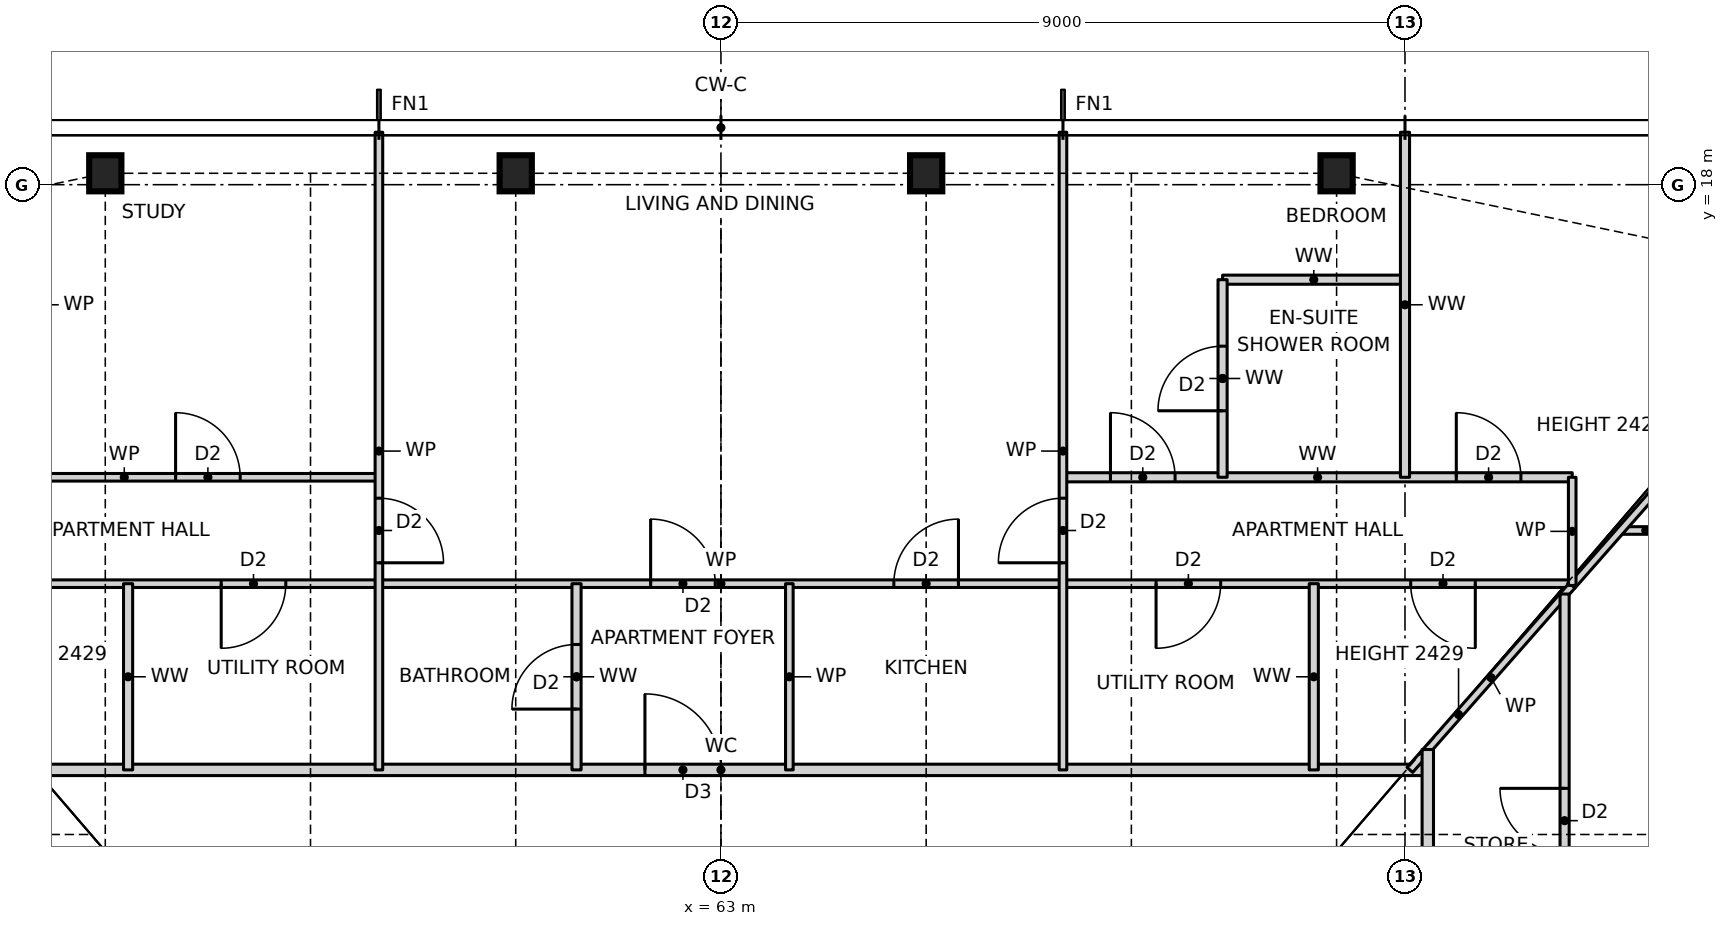
"""IFC4 building model, lengths in metres.
Left out: names, types, materials, properties, quantities, classifications, styles, units other than length and angle.
Written with IfcOpenShell. Run it as: python <this file> out.ifc"""

import sys

from ifc_helpers import new_model, si_unit, direction, frame, frame_2d, origin, origin_2d, place, context, subcontext, project, spatial, rectangle, i_section, extrude, element, fill, save


model = new_model("IFC4")
c1 = context("Model", 3, precision=1e-05, world=origin(), true_north=direction((0.0, 1.0)))
c2 = subcontext(c1, "Body", "Model", "MODEL_VIEW")
j1 = project(units=[si_unit("LENGTHUNIT", "METRE"), si_unit("PLANEANGLEUNIT", "RADIAN")], contexts=[c1])
p1 = place(None, origin())
s1 = spatial("IfcSite", under=j1, at=p1, CompositionType="ELEMENT")
p2 = place(p1, origin())
s2 = spatial("IfcBuilding", under=s1, at=p2, CompositionType="ELEMENT")
p3 = place(p2, frame((0.0, 0.0, 15.0)))
s3 = spatial("IfcBuildingStorey", under=s2, at=p3, CompositionType="ELEMENT", Elevation=15.0)
for number, where, z_axis, x_axis in (
    (1, (71.1, 18.15, 0.0), (0.0, 0.0, 1.0), (1.0, 0.0, 0.0)),
    (2, (65.7, 18.15, 0.0), (0.0, 0.0, 1.0), (1.0, 0.0, 0.0)),
    (3, (60.3, 18.15, 0.0), (0.0, 0.0, 1.0), (1.0, 0.0, 0.0)),
    (4, (54.9, 18.15, 0.0), (0.0, 0.0, 1.0), (1.0, 0.0, 0.0)),
):
    element("IfcColumn", number, at=place(p3, frame(where, z_axis=z_axis, x_axis=x_axis)), inside=s3, PredefinedType="COLUMN", context=c2, shape_type="SweptSolid", body=[
        extrude(i_section(OverallWidth=0.424, OverallDepth=0.475, WebThickness=0.048, FlangeThickness=0.077, at=origin_2d()), origin(), (0.0, 0.0, 1.0), 3.5),
    ])
p4 = place(p3, frame((53.7, 10.3, 0.0), z_axis=(0.0, 0.0, 1.0), x_axis=(1.0, 0.0, 0.0)))
e5 = element("IfcWall", 5, at=p4, inside=s3, PredefinedType="PARTITIONING", context=c2, shape_type="SweptSolid", body=[
    extrude(rectangle(XDim=18.6, YDim=0.15, at=frame_2d((9.3, 0.0))), origin(), (0.0, 0.0, 1.0), 3.27),
])
p5 = place(p4, frame((8.3, 0.0, 0.0)))
e6 = element("IfcOpeningElement", 6, at=p5, cuts=e5, PredefinedType="OPENING", context=c2, shape_type="SweptSolid", body=[
    extrude(rectangle(XDim=1.0, YDim=2.1, at=frame_2d((0.5, 1.05))), frame((0.0, 0.085, 0.0), z_axis=(0.0, -1.0, 0.0), x_axis=(1.0, 0.0, 0.0)), (0.0, 0.0, 1.0), 0.17),
])
p6 = place(p3, frame((51.8, 12.75, 0.0), z_axis=(0.0, 0.0, 1.0), x_axis=(1.0, 0.0, 0.0)))
e7 = element("IfcWall", 7, at=p6, inside=s3, PredefinedType="PARTITIONING", context=c2, shape_type="SweptSolid", body=[
    extrude(rectangle(XDim=22.4, YDim=0.1, at=frame_2d((11.2, 0.0))), origin(), (0.0, 0.0, 1.0), 3.27),
])
p7 = place(p6, frame((13.475, 0.0, 0.0)))
e8 = element("IfcOpeningElement", 8, at=p7, cuts=e7, PredefinedType="OPENING", context=c2, shape_type="SweptSolid", body=[
    extrude(rectangle(XDim=0.85, YDim=2.1, at=frame_2d((0.425, 1.05))), frame((0.0, 0.06, 0.0), z_axis=(0.0, -1.0, 0.0), x_axis=(1.0, 0.0, 0.0)), (0.0, 0.0, 1.0), 0.12),
])
p8 = place(p6, frame((10.275, 0.0, 0.0)))
e9 = element("IfcOpeningElement", 9, at=p8, cuts=e7, PredefinedType="OPENING", context=c2, shape_type="SweptSolid", body=[
    extrude(rectangle(XDim=0.85, YDim=2.1, at=frame_2d((0.425, 1.05))), frame((0.0, 0.06, 0.0), z_axis=(0.0, -1.0, 0.0), x_axis=(1.0, 0.0, 0.0)), (0.0, 0.0, 1.0), 0.12),
])
p9 = place(p6, frame((16.925, 0.0, 0.0)))
e10 = element("IfcOpeningElement", 10, at=p9, cuts=e7, PredefinedType="OPENING", context=c2, shape_type="SweptSolid", body=[
    extrude(rectangle(XDim=0.85, YDim=2.1, at=frame_2d((0.425, 1.05))), frame((0.0, 0.06, 0.0), z_axis=(0.0, -1.0, 0.0), x_axis=(1.0, 0.0, 0.0)), (0.0, 0.0, 1.0), 0.12),
])
p10 = place(p6, frame((20.275, 0.0, 0.0)))
e11 = element("IfcOpeningElement", 11, at=p10, cuts=e7, PredefinedType="OPENING", context=c2, shape_type="SweptSolid", body=[
    extrude(rectangle(XDim=0.85, YDim=2.1, at=frame_2d((0.425, 1.05))), frame((0.0, 0.06, 0.0), z_axis=(0.0, -1.0, 0.0), x_axis=(1.0, 0.0, 0.0)), (0.0, 0.0, 1.0), 0.12),
])
p11 = place(p6, frame((4.625, 0.0, 0.0)))
e12 = element("IfcOpeningElement", 12, at=p11, cuts=e7, PredefinedType="OPENING", context=c2, shape_type="SweptSolid", body=[
    extrude(rectangle(XDim=0.85, YDim=2.1, at=frame_2d((0.425, 1.05))), frame((0.0, 0.06, 0.0), z_axis=(0.0, -1.0, 0.0), x_axis=(1.0, 0.0, 0.0)), (0.0, 0.0, 1.0), 0.12),
])
p12 = place(p6, frame((1.275, 0.0, 0.0)))
e13 = element("IfcOpeningElement", 13, at=p12, cuts=e7, PredefinedType="OPENING", context=c2, shape_type="SweptSolid", body=[
    extrude(rectangle(XDim=0.85, YDim=2.1, at=frame_2d((0.425, 1.05))), frame((0.0, 0.06, 0.0), z_axis=(0.0, -1.0, 0.0), x_axis=(1.0, 0.0, 0.0)), (0.0, 0.0, 1.0), 0.12),
])
p13 = place(p3, frame((74.836, 13.45, 0.0), z_axis=(0.0, 0.0, 1.0), x_axis=(1.0, 0.0, 0.0)))
e14 = element("IfcWall", 14, at=p13, inside=s3, PredefinedType="PARTITIONING", context=c2, shape_type="SweptSolid", body=[
    extrude(rectangle(XDim=0.664, YDim=0.1, at=frame_2d((0.332, 0.0))), origin(), (0.0, 0.0, 1.0), 3.27),
])
p14 = place(p3, frame((51.8, 14.15, 0.0), z_axis=(0.0, 0.0, 1.0), x_axis=(1.0, 0.0, 0.0)))
e15 = element("IfcWall", 15, at=p14, inside=s3, PredefinedType="PARTITIONING", context=c2, shape_type="SweptSolid", body=[
    extrude(rectangle(XDim=6.7, YDim=0.1, at=frame_2d((3.35, 0.0))), origin(), (0.0, 0.0, 1.0), 3.27),
])
p15 = place(p14, frame((4.025, 0.0, 0.0)))
e16 = element("IfcOpeningElement", 16, at=p15, cuts=e15, PredefinedType="OPENING", context=c2, shape_type="SweptSolid", body=[
    extrude(rectangle(XDim=0.85, YDim=2.1, at=frame_2d((0.425, 1.05))), frame((0.0, 0.06, 0.0), z_axis=(0.0, -1.0, 0.0), x_axis=(1.0, 0.0, 0.0)), (0.0, 0.0, 1.0), 0.12),
])
p16 = place(p14, frame((0.675, 0.0, 0.0)))
e17 = element("IfcOpeningElement", 17, at=p16, cuts=e15, PredefinedType="OPENING", context=c2, shape_type="SweptSolid", body=[
    extrude(rectangle(XDim=0.85, YDim=2.1, at=frame_2d((0.425, 1.05))), frame((0.0, 0.06, 0.0), z_axis=(0.0, -1.0, 0.0), x_axis=(1.0, 0.0, 0.0)), (0.0, 0.0, 1.0), 0.12),
])
p17 = place(p3, frame((67.5, 14.15, 0.0), z_axis=(0.0, 0.0, 1.0), x_axis=(1.0, 0.0, 0.0)))
e18 = element("IfcWall", 18, at=p17, inside=s3, PredefinedType="PARTITIONING", context=c2, shape_type="SweptSolid", body=[
    extrude(rectangle(XDim=6.7, YDim=0.12, at=frame_2d((3.35, 0.0))), origin(), (0.0, 0.0, 1.0), 3.27),
])
p18 = place(p17, frame((0.625, 0.0, 0.0)))
e19 = element("IfcOpeningElement", 19, at=p18, cuts=e18, PredefinedType="OPENING", context=c2, shape_type="SweptSolid", body=[
    extrude(rectangle(XDim=0.85, YDim=2.1, at=frame_2d((0.425, 1.05))), frame((0.0, 0.07, 0.0), z_axis=(0.0, -1.0, 0.0), x_axis=(1.0, 0.0, 0.0)), (0.0, 0.0, 1.0), 0.14),
])
p19 = place(p17, frame((5.175, 0.0, 0.0)))
e20 = element("IfcOpeningElement", 20, at=p19, cuts=e18, PredefinedType="OPENING", context=c2, shape_type="SweptSolid", body=[
    extrude(rectangle(XDim=0.85, YDim=2.1, at=frame_2d((0.425, 1.05))), frame((0.0, 0.07, 0.0), z_axis=(0.0, -1.0, 0.0), x_axis=(1.0, 0.0, 0.0)), (0.0, 0.0, 1.0), 0.14),
])
p20 = place(p3, frame((69.6, 16.75, 0.0), z_axis=(0.0, 0.0, 1.0), x_axis=(1.0, 0.0, 0.0)))
e21 = element("IfcWall", 21, at=p20, inside=s3, PredefinedType="PARTITIONING", context=c2, shape_type="SweptSolid", body=[
    extrude(rectangle(XDim=2.4, YDim=0.12, at=frame_2d((1.2, 0.0))), origin(), (0.0, 0.0, 1.0), 3.27),
])
p21 = place(p3, frame((72.064, 10.3, 0.0), z_axis=(0.0, 0.0, 1.0), x_axis=(0.660667046586, 0.75067906162, 0.0)))
e22 = element("IfcWall", 22, at=p21, inside=s3, PredefinedType="PARTITIONING", context=c2, shape_type="SweptSolid", body=[
    extrude(rectangle(XDim=3.233, YDim=0.1, at=frame_2d((1.617, 0.0))), origin(), (0.0, 0.0, 1.0), 2.429),
])
p22 = place(p3, frame((74.2, 12.727, 0.0), z_axis=(0.0, 0.0, 1.0), x_axis=(0.660698595885, 0.750651294141, 0.0)))
e23 = element("IfcWall", 23, at=p22, inside=s3, PredefinedType="PARTITIONING", context=c2, shape_type="SweptSolid", body=[
    extrude(rectangle(XDim=5.838, YDim=0.1, at=frame_2d((2.919, 0.0))), origin(), (0.0, 0.0, 1.0), 2.429),
])
p23 = place(p3, frame((74.2, 12.727, 0.0), z_axis=(0.0, 0.0, 1.0), x_axis=(0.0, 1.0, 0.0)))
e24 = element("IfcWall", 24, at=p23, inside=s3, PredefinedType="PARTITIONING", context=c2, shape_type="SweptSolid", body=[
    extrude(rectangle(XDim=1.423, YDim=0.1, at=frame_2d((0.711, 0.0))), origin(), (0.0, 0.0, 1.0), 3.27),
])
p24 = place(p3, frame((74.1, -12.614, 0.0), z_axis=(0.0, 0.0, 1.0), x_axis=(0.0, 1.0, 0.0)))
e25 = element("IfcWall", 25, at=p24, inside=s3, PredefinedType="PARTITIONING", context=c2, shape_type="SweptSolid", body=[
    extrude(rectangle(XDim=25.228, YDim=0.12, at=frame_2d((12.614, 0.0))), origin(), (0.0, 0.0, 1.0), 3.27),
])
p25 = place(p24, frame((7.239, 0.0, 0.0)))
e26 = element("IfcOpeningElement", 26, at=p25, cuts=e25, PredefinedType="OPENING", context=c2, shape_type="SweptSolid", body=[
    extrude(rectangle(XDim=0.85, YDim=2.1, at=frame_2d((0.425, 1.05))), frame((0.0, 0.07, 0.0), z_axis=(0.0, -1.0, 0.0), x_axis=(1.0, 0.0, 0.0)), (0.0, 0.0, 1.0), 0.14),
])
p26 = place(p24, frame((10.439, 0.0, 0.0)))
e27 = element("IfcOpeningElement", 27, at=p26, cuts=e25, PredefinedType="OPENING", context=c2, shape_type="SweptSolid", body=[
    extrude(rectangle(XDim=0.85, YDim=2.1, at=frame_2d((0.425, 1.05))), frame((0.0, 0.07, 0.0), z_axis=(0.0, -1.0, 0.0), x_axis=(1.0, 0.0, 0.0)), (0.0, 0.0, 1.0), 0.14),
])
p27 = place(p24, frame((2.507, 0.0, 0.0)))
e28 = element("IfcOpeningElement", 28, at=p27, cuts=e25, PredefinedType="OPENING", context=c2, shape_type="SweptSolid", body=[
    extrude(rectangle(XDim=0.85, YDim=2.1, at=frame_2d((0.425, 1.05))), frame((0.0, 0.07, 0.0), z_axis=(0.0, -1.0, 0.0), x_axis=(1.0, 0.0, 0.0)), (0.0, 0.0, 1.0), 0.14),
])
p28 = place(p24, frame((16.639, 0.0, 0.0)))
e29 = element("IfcOpeningElement", 29, at=p28, cuts=e25, PredefinedType="OPENING", context=c2, shape_type="SweptSolid", body=[
    extrude(rectangle(XDim=0.85, YDim=2.1, at=frame_2d((0.425, 1.05))), frame((0.0, 0.07, 0.0), z_axis=(0.0, -1.0, 0.0), x_axis=(1.0, 0.0, 0.0)), (0.0, 0.0, 1.0), 0.14),
])
p29 = place(p24, frame((21.821, 0.0, 0.0)))
e30 = element("IfcOpeningElement", 30, at=p29, cuts=e25, PredefinedType="OPENING", context=c2, shape_type="SweptSolid", body=[
    extrude(rectangle(XDim=0.85, YDim=2.1, at=frame_2d((0.425, 1.05))), frame((0.0, 0.07, 0.0), z_axis=(0.0, -1.0, 0.0), x_axis=(1.0, 0.0, 0.0)), (0.0, 0.0, 1.0), 0.14),
])
p30 = place(p3, frame((72.3, -10.9, 0.0), z_axis=(0.0, 0.0, 1.0), x_axis=(0.0, 1.0, 0.0)))
e31 = element("IfcWall", 31, at=p30, inside=s3, PredefinedType="PARTITIONING", context=c2, shape_type="SweptSolid", body=[
    extrude(rectangle(XDim=21.468, YDim=0.15, at=frame_2d((10.734, 0.0))), origin(), (0.0, 0.0, 1.0), 3.27),
])
p31 = place(p30, frame((8.65, 0.0, 0.0)))
e32 = element("IfcOpeningElement", 32, at=p31, cuts=e31, PredefinedType="OPENING", context=c2, shape_type="SweptSolid", body=[
    extrude(rectangle(XDim=1.0, YDim=2.1, at=frame_2d((0.5, 1.05))), frame((0.0, 0.085, 0.0), z_axis=(0.0, -1.0, 0.0), x_axis=(1.0, 0.0, 0.0)), (0.0, 0.0, 1.0), 0.17),
])
p32 = place(p3, frame((72.0, 14.15, 0.0), z_axis=(0.0, 0.0, 1.0), x_axis=(0.0, 1.0, 0.0)))
e33 = element("IfcWall", 33, at=p32, inside=s3, PredefinedType="PARTITIONING", context=c2, shape_type="SweptSolid", body=[
    extrude(rectangle(XDim=4.54, YDim=0.12, at=frame_2d((2.27, 0.0))), origin(), (0.0, 0.0, 1.0), 3.27),
])
p33 = place(p3, frame((70.8, 10.3, 0.0), z_axis=(0.0, 0.0, 1.0), x_axis=(0.0, 1.0, 0.0)))
e34 = element("IfcWall", 34, at=p33, inside=s3, PredefinedType="PARTITIONING", context=c2, shape_type="SweptSolid", body=[
    extrude(rectangle(XDim=2.45, YDim=0.12, at=frame_2d((1.225, 0.0))), origin(), (0.0, 0.0, 1.0), 3.27),
])
p34 = place(p3, frame((69.6, 14.15, 0.0), z_axis=(0.0, 0.0, 1.0), x_axis=(0.0, 1.0, 0.0)))
e35 = element("IfcWall", 35, at=p34, inside=s3, PredefinedType="PARTITIONING", context=c2, shape_type="SweptSolid", body=[
    extrude(rectangle(XDim=2.6, YDim=0.12, at=frame_2d((1.3, 0.0))), origin(), (0.0, 0.0, 1.0), 3.27),
])
p35 = place(p34, frame((0.875, 0.0, 0.0)))
e36 = element("IfcOpeningElement", 36, at=p35, cuts=e35, PredefinedType="OPENING", context=c2, shape_type="SweptSolid", body=[
    extrude(rectangle(XDim=0.85, YDim=2.1, at=frame_2d((0.425, 1.05))), frame((0.0, 0.07, 0.0), z_axis=(0.0, -1.0, 0.0), x_axis=(1.0, 0.0, 0.0)), (0.0, 0.0, 1.0), 0.14),
])
p36 = place(p3, frame((67.5, 10.3, 0.0), z_axis=(0.0, 0.0, 1.0), x_axis=(0.0, 1.0, 0.0)))
e37 = element("IfcWall", 37, at=p36, inside=s3, PredefinedType="PARTITIONING", context=c2, shape_type="SweptSolid", body=[
    extrude(rectangle(XDim=8.39, YDim=0.1, at=frame_2d((4.195, 0.0))), origin(), (0.0, 0.0, 1.0), 3.27),
])
p37 = place(p36, frame((2.725, 0.0, 0.0)))
e38 = element("IfcOpeningElement", 38, at=p37, cuts=e37, PredefinedType="OPENING", context=c2, shape_type="SweptSolid", body=[
    extrude(rectangle(XDim=0.85, YDim=2.1, at=frame_2d((0.425, 1.05))), frame((0.0, 0.06, 0.0), z_axis=(0.0, -1.0, 0.0), x_axis=(1.0, 0.0, 0.0)), (0.0, 0.0, 1.0), 0.12),
])
p38 = place(p3, frame((63.9, 10.3, 0.0), z_axis=(0.0, 0.0, 1.0), x_axis=(0.0, 1.0, 0.0)))
e39 = element("IfcWall", 39, at=p38, inside=s3, PredefinedType="PARTITIONING", context=c2, shape_type="SweptSolid", body=[
    extrude(rectangle(XDim=2.45, YDim=0.1, at=frame_2d((1.225, 0.0))), origin(), (0.0, 0.0, 1.0), 3.27),
])
p39 = place(p3, frame((61.1, 10.3, 0.0), z_axis=(0.0, 0.0, 1.0), x_axis=(0.0, 1.0, 0.0)))
e40 = element("IfcWall", 40, at=p39, inside=s3, PredefinedType="PARTITIONING", context=c2, shape_type="SweptSolid", body=[
    extrude(rectangle(XDim=2.45, YDim=0.12, at=frame_2d((1.225, 0.0))), origin(), (0.0, 0.0, 1.0), 3.27),
])
p40 = place(p39, frame((0.8, 0.0, 0.0)))
e41 = element("IfcOpeningElement", 41, at=p40, cuts=e40, PredefinedType="OPENING", context=c2, shape_type="SweptSolid", body=[
    extrude(rectangle(XDim=0.85, YDim=2.1, at=frame_2d((0.425, 1.05))), frame((0.0, 0.07, 0.0), z_axis=(0.0, -1.0, 0.0), x_axis=(1.0, 0.0, 0.0)), (0.0, 0.0, 1.0), 0.14),
])
p41 = place(p3, frame((58.5, 10.3, 0.0), z_axis=(0.0, 0.0, 1.0), x_axis=(0.0, 1.0, 0.0)))
e42 = element("IfcWall", 42, at=p41, inside=s3, PredefinedType="PARTITIONING", context=c2, shape_type="SweptSolid", body=[
    extrude(rectangle(XDim=8.39, YDim=0.1, at=frame_2d((4.195, 0.0))), origin(), (0.0, 0.0, 1.0), 3.27),
])
p42 = place(p41, frame((2.725, 0.0, 0.0)))
e43 = element("IfcOpeningElement", 43, at=p42, cuts=e42, PredefinedType="OPENING", context=c2, shape_type="SweptSolid", body=[
    extrude(rectangle(XDim=0.85, YDim=2.1, at=frame_2d((0.425, 1.05))), frame((0.0, 0.06, 0.0), z_axis=(0.0, -1.0, 0.0), x_axis=(1.0, 0.0, 0.0)), (0.0, 0.0, 1.0), 0.12),
])
p43 = place(p3, frame((55.2, 10.3, 0.0), z_axis=(0.0, 0.0, 1.0), x_axis=(0.0, 1.0, 0.0)))
e44 = element("IfcWall", 44, at=p43, inside=s3, PredefinedType="PARTITIONING", context=c2, shape_type="SweptSolid", body=[
    extrude(rectangle(XDim=2.45, YDim=0.12, at=frame_2d((1.225, 0.0))), origin(), (0.0, 0.0, 1.0), 3.27),
])
p44 = place(p29, origin())
e45 = element("IfcDoor", 45, at=p44, inside=s3, OperationType="SINGLE_SWING_RIGHT", PredefinedType="DOOR", context=c2, shape_type="SweptSolid", body=[
    extrude(rectangle(XDim=0.85, YDim=2.1, at=frame_2d((0.425, 1.05))), frame((0.0, 0.025, 0.0), z_axis=(0.0, -1.0, 0.0), x_axis=(1.0, 0.0, 0.0)), (0.0, 0.0, 1.0), 0.05),
])
fill(e30, e45)
p45 = place(p7, origin())
e46 = element("IfcDoor", 46, at=p45, inside=s3, OperationType="SINGLE_SWING_RIGHT", PredefinedType="DOOR", context=c2, shape_type="SweptSolid", body=[
    extrude(rectangle(XDim=0.85, YDim=2.1, at=frame_2d((0.425, 1.05))), frame((0.0, 0.025, 0.0), z_axis=(0.0, -1.0, 0.0), x_axis=(1.0, 0.0, 0.0)), (0.0, 0.0, 1.0), 0.05),
])
fill(e8, e46)
p46 = place(p5, origin())
e47 = element("IfcDoor", 47, at=p46, inside=s3, OperationType="SINGLE_SWING_LEFT", PredefinedType="DOOR", context=c2, shape_type="SweptSolid", body=[
    extrude(rectangle(XDim=1.0, YDim=2.1, at=frame_2d((0.5, 1.05))), frame((0.0, 0.025, 0.0), z_axis=(0.0, -1.0, 0.0), x_axis=(1.0, 0.0, 0.0)), (0.0, 0.0, 1.0), 0.05),
])
fill(e6, e47)
p47 = place(p8, origin())
e48 = element("IfcDoor", 48, at=p47, inside=s3, OperationType="SINGLE_SWING_LEFT", PredefinedType="DOOR", context=c2, shape_type="SweptSolid", body=[
    extrude(rectangle(XDim=0.85, YDim=2.1, at=frame_2d((0.425, 1.05))), frame((0.0, 0.025, 0.0), z_axis=(0.0, -1.0, 0.0), x_axis=(1.0, 0.0, 0.0)), (0.0, 0.0, 1.0), 0.05),
])
fill(e9, e48)
p48 = place(p40, origin())
e49 = element("IfcDoor", 49, at=p48, inside=s3, OperationType="SINGLE_SWING_LEFT", PredefinedType="DOOR", context=c2, shape_type="SweptSolid", body=[
    extrude(rectangle(XDim=0.85, YDim=2.1, at=frame_2d((0.425, 1.05))), frame((0.0, 0.025, 0.0), z_axis=(0.0, -1.0, 0.0), x_axis=(1.0, 0.0, 0.0)), (0.0, 0.0, 1.0), 0.05),
])
fill(e41, e49)
p49 = place(p37, origin())
e50 = element("IfcDoor", 50, at=p49, inside=s3, OperationType="SINGLE_SWING_LEFT", PredefinedType="DOOR", context=c2, shape_type="SweptSolid", body=[
    extrude(rectangle(XDim=0.85, YDim=2.1, at=frame_2d((0.425, 1.05))), frame((0.0, 0.025, 0.0), z_axis=(0.0, -1.0, 0.0), x_axis=(1.0, 0.0, 0.0)), (0.0, 0.0, 1.0), 0.05),
])
fill(e38, e50)
p50 = place(p35, origin())
e51 = element("IfcDoor", 51, at=p50, inside=s3, OperationType="SINGLE_SWING_LEFT", PredefinedType="DOOR", context=c2, shape_type="SweptSolid", body=[
    extrude(rectangle(XDim=0.85, YDim=2.1, at=frame_2d((0.425, 1.05))), frame((0.0, 0.025, 0.0), z_axis=(0.0, -1.0, 0.0), x_axis=(1.0, 0.0, 0.0)), (0.0, 0.0, 1.0), 0.05),
])
fill(e36, e51)
p51 = place(p18, origin())
e52 = element("IfcDoor", 52, at=p51, inside=s3, OperationType="SINGLE_SWING_LEFT", PredefinedType="DOOR", context=c2, shape_type="SweptSolid", body=[
    extrude(rectangle(XDim=0.85, YDim=2.1, at=frame_2d((0.425, 1.05))), frame((0.0, 0.025, 0.0), z_axis=(0.0, -1.0, 0.0), x_axis=(1.0, 0.0, 0.0)), (0.0, 0.0, 1.0), 0.05),
])
fill(e19, e52)
p52 = place(p19, origin())
e53 = element("IfcDoor", 53, at=p52, inside=s3, OperationType="SINGLE_SWING_LEFT", PredefinedType="DOOR", context=c2, shape_type="SweptSolid", body=[
    extrude(rectangle(XDim=0.85, YDim=2.1, at=frame_2d((0.425, 1.05))), frame((0.0, 0.025, 0.0), z_axis=(0.0, -1.0, 0.0), x_axis=(1.0, 0.0, 0.0)), (0.0, 0.0, 1.0), 0.05),
])
fill(e20, e53)
p53 = place(p9, frame((0.85, 0.0, 0.0), z_axis=(0.0, 0.0, 1.0), x_axis=(-1.0, 0.0, 0.0)))
e54 = element("IfcDoor", 54, at=p53, inside=s3, OperationType="SINGLE_SWING_RIGHT", PredefinedType="DOOR", context=c2, shape_type="SweptSolid", body=[
    extrude(rectangle(XDim=0.85, YDim=2.1, at=frame_2d((0.425, 1.05))), frame((0.0, 0.025, 0.0), z_axis=(0.0, -1.0, 0.0), x_axis=(1.0, 0.0, 0.0)), (0.0, 0.0, 1.0), 0.05),
])
fill(e10, e54)
p54 = place(p10, frame((0.85, 0.0, 0.0), z_axis=(0.0, 0.0, 1.0), x_axis=(-1.0, 0.0, 0.0)))
e55 = element("IfcDoor", 55, at=p54, inside=s3, OperationType="SINGLE_SWING_LEFT", PredefinedType="DOOR", context=c2, shape_type="SweptSolid", body=[
    extrude(rectangle(XDim=0.85, YDim=2.1, at=frame_2d((0.425, 1.05))), frame((0.0, 0.025, 0.0), z_axis=(0.0, -1.0, 0.0), x_axis=(1.0, 0.0, 0.0)), (0.0, 0.0, 1.0), 0.05),
])
fill(e11, e55)
p55 = place(p42, frame((0.85, 0.0, 0.0), z_axis=(0.0, 0.0, 1.0), x_axis=(-1.0, 0.0, 0.0)))
e56 = element("IfcDoor", 56, at=p55, inside=s3, OperationType="SINGLE_SWING_RIGHT", PredefinedType="DOOR", context=c2, shape_type="SweptSolid", body=[
    extrude(rectangle(XDim=0.85, YDim=2.1, at=frame_2d((0.425, 1.05))), frame((0.0, 0.025, 0.0), z_axis=(0.0, -1.0, 0.0), x_axis=(1.0, 0.0, 0.0)), (0.0, 0.0, 1.0), 0.05),
])
fill(e43, e56)
p56 = place(p15, origin())
e57 = element("IfcDoor", 57, at=p56, inside=s3, OperationType="SINGLE_SWING_LEFT", PredefinedType="DOOR", context=c2, shape_type="SweptSolid", body=[
    extrude(rectangle(XDim=0.85, YDim=2.1, at=frame_2d((0.425, 1.05))), frame((0.0, 0.025, 0.0), z_axis=(0.0, -1.0, 0.0), x_axis=(1.0, 0.0, 0.0)), (0.0, 0.0, 1.0), 0.05),
])
fill(e16, e57)
p57 = place(p11, frame((0.85, 0.0, 0.0), z_axis=(0.0, 0.0, 1.0), x_axis=(-1.0, 0.0, 0.0)))
e58 = element("IfcDoor", 58, at=p57, inside=s3, OperationType="SINGLE_SWING_RIGHT", PredefinedType="DOOR", context=c2, shape_type="SweptSolid", body=[
    extrude(rectangle(XDim=0.85, YDim=2.1, at=frame_2d((0.425, 1.05))), frame((0.0, 0.025, 0.0), z_axis=(0.0, -1.0, 0.0), x_axis=(1.0, 0.0, 0.0)), (0.0, 0.0, 1.0), 0.05),
])
fill(e12, e58)
save(model, sys.argv[1])
